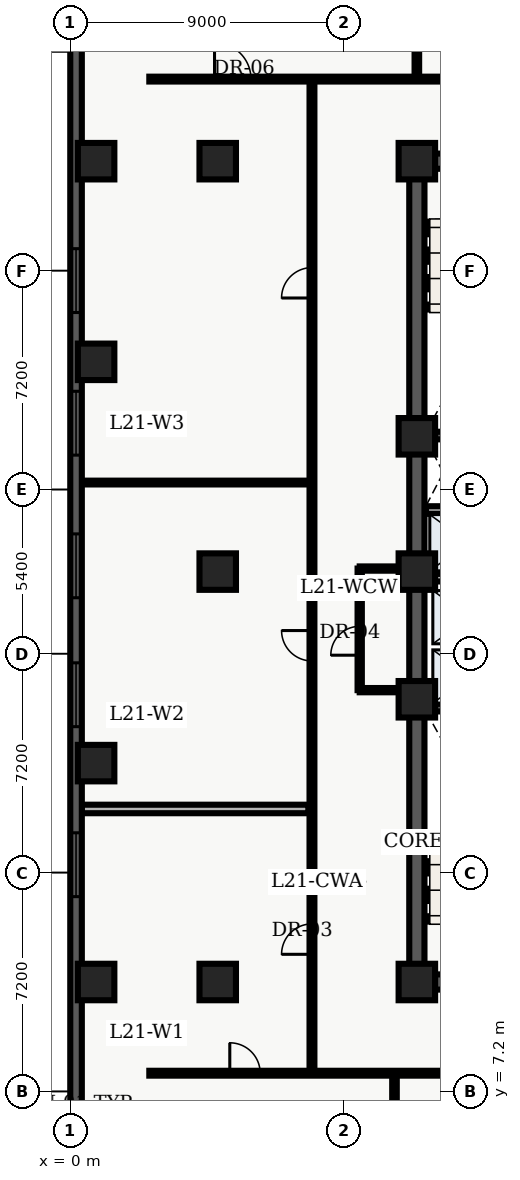
"""IFC4 building model, lengths in metres.
Left out: names, types, materials, properties, quantities, classifications, styles, units other than length and angle.
Written with IfcOpenShell. Run it as: python <this file> out.ifc"""

import sys

from ifc_helpers import new_model, entity, si_unit, converted_unit, direction, frame, origin_with_axes, origin_2d_with_axis, place, context, subcontext, project, spatial, polyline, rectangle, outline, extrude, element, fill, save


model = new_model("IFC4")
c1 = context("Model", 3, precision=1e-05, world=origin_with_axes(), true_north=direction((0.0, 1.0)))
c2 = subcontext(c1, "Body", "Model", "MODEL_VIEW")
j1 = project(units=[si_unit("LENGTHUNIT", "METRE"), converted_unit("PLANEANGLEUNIT", "DEGREE", entity("IfcPlaneAngleMeasure", 0.017), si_unit("PLANEANGLEUNIT", "RADIAN"), dimensions=[0, 0, 0, 0, 0, 0, 0])], contexts=[c1])
p1 = place(None, origin_with_axes())
s1 = spatial("IfcSite", under=j1, at=p1, CompositionType="ELEMENT")
p2 = place(p1, origin_with_axes())
s2 = spatial("IfcBuilding", under=s1, at=p2, CompositionType="ELEMENT")
p3 = place(p2, frame((0.0, 0.0, 89.1), z_axis=(0.0, 0.0, 1.0), x_axis=(1.0, 0.0, 0.0)))
s3 = spatial("IfcBuildingStorey", under=s2, at=p3, CompositionType="ELEMENT", Elevation=89.1)
p4 = place(p3, frame((11.4, 10.8, 0.0), z_axis=(0.0, 0.0, 1.0), x_axis=(0.0, 1.0, 0.0)))
e1 = element("IfcWall", 1, at=p4, inside=s3, PredefinedType="SHEAR", context=c2, shape_type="SweptSolid", body=[
    extrude(outline(polyline([(0.0, -0.25), (27.0, -0.25), (27.0, 0.25), (0.0, 0.25), (0.0, -0.25)])), origin_with_axes(), (0.0, 0.0, 1.0), 3.66),
])
p5 = place(p3, frame((11.4, 10.8, 0.0), z_axis=(0.0, 0.0, 1.0), x_axis=(1.0, 0.0, 0.0)))
e2 = element("IfcWall", 2, at=p5, inside=s3, PredefinedType="SHEAR", context=c2, shape_type="SweptSolid", body=[
    extrude(outline(polyline([(0.0, -0.25), (7.2, -0.25), (7.2, 0.25), (0.0, 0.25), (0.0, -0.25)])), origin_with_axes(), (0.0, 0.0, 1.0), 3.66),
])
p6 = place(p5, frame((2.625, 0.0, 0.0), z_axis=(0.0, 0.0, 1.0), x_axis=(1.0, 0.0, 0.0)))
e3 = element("IfcOpeningElement", 3, at=p6, cuts=e2, PredefinedType="OPENING", context=c2, shape_type="SweptSolid", body=[
    extrude(rectangle(XDim=1.05, YDim=0.52, at=origin_2d_with_axis()), origin_with_axes(), (0.0, 0.0, 1.0), 2.15),
])
p7 = place(p3, frame((11.4, 37.8, 0.0), z_axis=(0.0, 0.0, 1.0), x_axis=(1.0, 0.0, 0.0)))
e4 = element("IfcWall", 4, at=p7, inside=s3, PredefinedType="SHEAR", context=c2, shape_type="SweptSolid", body=[
    extrude(outline(polyline([(0.0, -0.25), (7.2, -0.25), (7.2, 0.25), (0.0, 0.25), (0.0, -0.25)])), origin_with_axes(), (0.0, 0.0, 1.0), 3.66),
])
p8 = place(p7, frame((2.625, 0.0, 0.0), z_axis=(0.0, 0.0, 1.0), x_axis=(1.0, 0.0, 0.0)))
e5 = element("IfcOpeningElement", 5, at=p8, cuts=e4, PredefinedType="OPENING", context=c2, shape_type="SweptSolid", body=[
    extrude(rectangle(XDim=1.05, YDim=0.52, at=origin_2d_with_axis()), origin_with_axes(), (0.0, 0.0, 1.0), 2.15),
])
for number, where, z_axis, x_axis in (
    (6, (11.65, 19.825, 0.0), (0.0, 0.0, 1.0), (1.0, 0.0, 0.0)),
    (7, (11.65, 28.775, 0.0), (0.0, 0.0, 1.0), (1.0, 0.0, 0.0)),
):
    element("IfcWall", number, at=place(p3, frame(where, z_axis=z_axis, x_axis=x_axis)), inside=s3, PredefinedType="SHEAR", context=c2, shape_type="SweptSolid", body=[
        extrude(outline(polyline([(0.0, -0.125), (6.7, -0.125), (6.7, 0.125), (0.0, 0.125), (0.0, -0.125)])), origin_with_axes(), (0.0, 0.0, 1.0), 3.66),
    ])
p9 = place(p3, frame((11.7, 24.1, 0.0), z_axis=(0.0, 0.0, 1.0), x_axis=(1.0, 0.0, 0.0)))
e8 = element("IfcWall", 8, at=p9, inside=s3, PredefinedType="SOLIDWALL", context=c2, shape_type="SweptSolid", body=[
    extrude(outline(polyline([(0.0, -0.125), (6.6, -0.125), (6.6, 0.125), (0.0, 0.125), (0.0, -0.125)])), origin_with_axes(), (0.0, 0.0, 1.0), 2.7),
])
p10 = place(p9, frame((3.75, 0.0, 0.0), z_axis=(0.0, 0.0, 1.0), x_axis=(1.0, 0.0, 0.0)))
e9 = element("IfcOpeningElement", 9, at=p10, cuts=e8, PredefinedType="OPENING", context=c2, shape_type="SweptSolid", body=[
    extrude(rectangle(XDim=0.9, YDim=0.27, at=origin_2d_with_axis()), origin_with_axes(), (0.0, 0.0, 1.0), 2.15),
])
p11 = place(p3, frame((11.7, 26.325, 0.0), z_axis=(0.0, 0.0, 1.0), x_axis=(1.0, 0.0, 0.0)))
e10 = element("IfcWall", 10, at=p11, inside=s3, PredefinedType="SOLIDWALL", context=c2, shape_type="SweptSolid", body=[
    extrude(outline(polyline([(0.0, -0.125), (6.6, -0.125), (6.6, 0.125), (0.0, 0.125), (0.0, -0.125)])), origin_with_axes(), (0.0, 0.0, 1.0), 2.7),
])
p12 = place(p11, frame((3.5, 0.0, 0.0), z_axis=(0.0, 0.0, 1.0), x_axis=(1.0, 0.0, 0.0)))
e11 = element("IfcOpeningElement", 11, at=p12, cuts=e10, PredefinedType="OPENING", context=c2, shape_type="SweptSolid", body=[
    extrude(rectangle(XDim=0.9, YDim=0.27, at=origin_2d_with_axis()), origin_with_axes(), (0.0, 0.0, 1.0), 2.15),
])
for number, where, z_axis, x_axis in (
    (12, (11.4, 10.8, 0.0), (0.0, 0.0, 1.0), (1.0, 0.0, 0.0)),
    (13, (11.4, 20.1, 0.0), (0.0, 0.0, 1.0), (1.0, 0.0, 0.0)),
    (14, (11.4, 24.3, 0.0), (0.0, 0.0, 1.0), (1.0, 0.0, 0.0)),
    (15, (11.4, 28.75, 0.0), (0.0, 0.0, 1.0), (1.0, 0.0, 0.0)),
    (16, (11.4, 37.8, 0.0), (0.0, 0.0, 1.0), (1.0, 0.0, 0.0)),
    (17, (4.85, 10.8, 0.0), (0.0, 0.0, 1.0), (1.0, 0.0, 0.0)),
    (18, (4.85, 24.3, 0.0), (0.0, 0.0, 1.0), (1.0, 0.0, 0.0)),
    (19, (4.85, 37.8, 0.0), (0.0, 0.0, 1.0), (1.0, 0.0, 0.0)),
    (20, (0.85, 10.8, 0.0), (0.0, 0.0, 1.0), (1.0, 0.0, 0.0)),
    (21, (0.85, 18.0, 0.0), (0.0, 0.0, 1.0), (1.0, 0.0, 0.0)),
    (22, (0.85, 31.2, 0.0), (0.0, 0.0, 1.0), (1.0, 0.0, 0.0)),
    (23, (0.85, 37.8, 0.0), (0.0, 0.0, 1.0), (1.0, 0.0, 0.0)),
):
    element("IfcColumn", number, at=place(p3, frame(where, z_axis=z_axis, x_axis=x_axis)), inside=s3, PredefinedType="COLUMN", context=c2, shape_type="SweptSolid", body=[
        extrude(rectangle(XDim=1.2, YDim=1.2, at=origin_2d_with_axis()), origin_with_axes(), (0.0, 0.0, 1.0), 3.9),
    ])
p13 = place(p3, frame((9.52, 20.4, 0.0), z_axis=(0.0, 0.0, 1.0), x_axis=(0.0, 1.0, 0.0)))
e24 = element("IfcWall", 24, at=p13, inside=s3, PredefinedType="PARTITIONING", context=c2, shape_type="SweptSolid", body=[
    extrude(outline(polyline([(0.0, -0.07), (4.0, -0.07), (4.0, 0.07), (0.0, 0.07), (0.0, -0.07)])), origin_with_axes(), (0.0, 0.0, 1.0), 2.7),
])
p14 = place(p13, frame((1.625, 0.0, 0.0), z_axis=(0.0, 0.0, 1.0), x_axis=(1.0, 0.0, 0.0)))
e25 = element("IfcOpeningElement", 25, at=p14, cuts=e24, PredefinedType="OPENING", context=c2, shape_type="SweptSolid", body=[
    extrude(rectangle(XDim=0.95, YDim=0.16, at=origin_2d_with_axis()), origin_with_axes(), (0.0, 0.0, 1.0), 2.15),
])
for number, where, z_axis, x_axis in (
    (26, (9.52, 20.4, 0.0), (0.0, 0.0, 1.0), (1.0, 0.0, 0.0)),
    (27, (9.52, 24.4, 0.0), (0.0, 0.0, 1.0), (1.0, 0.0, 0.0)),
):
    element("IfcWall", number, at=place(p3, frame(where, z_axis=z_axis, x_axis=x_axis)), inside=s3, PredefinedType="PARTITIONING", context=c2, shape_type="SweptSolid", body=[
        extrude(outline(polyline([(0.0, -0.07), (1.58, -0.07), (1.58, 0.07), (0.0, 0.07), (0.0, -0.07)])), origin_with_axes(), (0.0, 0.0, 1.0), 2.7),
    ])
p15 = place(p3, frame((2.6, 7.8, 0.0), z_axis=(0.0, 0.0, 1.0), x_axis=(1.0, 0.0, 0.0)))
e28 = element("IfcWall", 28, at=p15, inside=s3, PredefinedType="PARTITIONING", context=c2, shape_type="SweptSolid", body=[
    extrude(outline(polyline([(0.0, -0.08), (18.625, -0.08), (18.625, 0.08), (0.0, 0.08), (0.0, -0.08)])), origin_with_axes(), (0.0, 0.0, 1.0), 2.7),
])
p16 = place(p15, frame((3.147, 0.0, 0.0), z_axis=(0.0, 0.0, 1.0), x_axis=(1.0, 0.0, 0.0)))
e29 = element("IfcOpeningElement", 29, at=p16, cuts=e28, PredefinedType="OPENING", context=c2, shape_type="SweptSolid", body=[
    extrude(rectangle(XDim=1.0, YDim=0.18, at=origin_2d_with_axis()), origin_with_axes(), (0.0, 0.0, 1.0), 2.15),
])
p17 = place(p15, frame((13.282, 0.0, 0.0), z_axis=(0.0, 0.0, 1.0), x_axis=(1.0, 0.0, 0.0)))
e30 = element("IfcOpeningElement", 30, at=p17, cuts=e28, PredefinedType="OPENING", context=c2, shape_type="SweptSolid", body=[
    extrude(rectangle(XDim=1.0, YDim=0.18, at=origin_2d_with_axis()), origin_with_axes(), (0.0, 0.0, 1.0), 2.15),
])
p18 = place(p3, frame((2.6, 40.5, 0.0), z_axis=(0.0, 0.0, 1.0), x_axis=(1.0, 0.0, 0.0)))
e31 = element("IfcWall", 31, at=p18, inside=s3, PredefinedType="PARTITIONING", context=c2, shape_type="SweptSolid", body=[
    extrude(outline(polyline([(0.0, -0.08), (18.65, -0.08), (18.65, 0.08), (0.0, 0.08), (0.0, -0.08)])), origin_with_axes(), (0.0, 0.0, 1.0), 2.7),
])
p19 = place(p18, frame((2.745, 0.0, 0.0), z_axis=(0.0, 0.0, 1.0), x_axis=(1.0, 0.0, 0.0)))
e32 = element("IfcOpeningElement", 32, at=p19, cuts=e31, PredefinedType="OPENING", context=c2, shape_type="SweptSolid", body=[
    extrude(rectangle(XDim=1.2, YDim=0.18, at=origin_2d_with_axis()), origin_with_axes(), (0.0, 0.0, 1.0), 2.2),
])
p20 = place(p18, frame((12.61, 0.0, 0.0), z_axis=(0.0, 0.0, 1.0), x_axis=(1.0, 0.0, 0.0)))
e33 = element("IfcOpeningElement", 33, at=p20, cuts=e31, PredefinedType="OPENING", context=c2, shape_type="SweptSolid", body=[
    extrude(rectangle(XDim=1.0, YDim=0.18, at=origin_2d_with_axis()), origin_with_axes(), (0.0, 0.0, 1.0), 2.15),
])
p21 = place(p3, frame((7.95, 7.8, 0.0), z_axis=(0.0, 0.0, 1.0), x_axis=(0.0, 1.0, 0.0)))
e34 = element("IfcWall", 34, at=p21, inside=s3, PredefinedType="PARTITIONING", context=c2, shape_type="SweptSolid", body=[
    extrude(outline(polyline([(0.0, -0.08), (32.7, -0.08), (32.7, 0.08), (0.0, 0.08), (0.0, -0.08)])), origin_with_axes(), (0.0, 0.0, 1.0), 2.7),
])
p22 = place(p21, frame((4.411, 0.0, 0.0), z_axis=(0.0, 0.0, 1.0), x_axis=(1.0, 0.0, 0.0)))
e35 = element("IfcOpeningElement", 35, at=p22, cuts=e34, PredefinedType="OPENING", context=c2, shape_type="SweptSolid", body=[
    extrude(rectangle(XDim=1.0, YDim=0.18, at=origin_2d_with_axis()), origin_with_axes(), (0.0, 0.0, 1.0), 2.15),
])
p23 = place(p21, frame((14.06, 0.0, 0.0), z_axis=(0.0, 0.0, 1.0), x_axis=(1.0, 0.0, 0.0)))
e36 = element("IfcOpeningElement", 36, at=p23, cuts=e34, PredefinedType="OPENING", context=c2, shape_type="SweptSolid", body=[
    extrude(rectangle(XDim=1.0, YDim=0.18, at=origin_2d_with_axis()), origin_with_axes(), (0.0, 0.0, 1.0), 2.15),
])
p24 = place(p21, frame((26.0, 0.0, 0.0), z_axis=(0.0, 0.0, 1.0), x_axis=(1.0, 0.0, 0.0)))
e37 = element("IfcOpeningElement", 37, at=p24, cuts=e34, PredefinedType="OPENING", context=c2, shape_type="SweptSolid", body=[
    extrude(rectangle(XDim=1.0, YDim=0.18, at=origin_2d_with_axis()), origin_with_axes(), (0.0, 0.0, 1.0), 2.15),
])
p25 = place(p3, frame((0.375, 16.492, 0.0), z_axis=(0.0, 0.0, 1.0), x_axis=(1.0, 0.0, 0.0)))
e38 = element("IfcWall", 38, at=p25, inside=s3, PredefinedType="PARTITIONING", context=c2, shape_type="SweptSolid", body=[
    extrude(outline(polyline([(0.0, -0.14), (7.455, -0.14), (7.455, 0.14), (0.0, 0.14), (0.0, -0.14)])), origin_with_axes(), (0.0, 0.0, 1.0), 2.7),
])
p26 = place(p3, frame((0.375, 27.229, 0.0), z_axis=(0.0, 0.0, 1.0), x_axis=(1.0, 0.0, 0.0)))
e39 = element("IfcWall", 39, at=p26, inside=s3, PredefinedType="PARTITIONING", context=c2, shape_type="SweptSolid", body=[
    extrude(outline(polyline([(0.0, -0.062), (7.455, -0.062), (7.455, 0.062), (0.0, 0.062), (0.0, -0.062)])), origin_with_axes(), (0.0, 0.0, 1.0), 2.7),
])
p27 = place(p3, frame((10.664, 0.36, 0.0), z_axis=(0.0, 0.0, 1.0), x_axis=(0.0, 1.0, 0.0)))
e40 = element("IfcWall", 40, at=p27, inside=s3, PredefinedType="PARTITIONING", context=c2, shape_type="SweptSolid", body=[
    extrude(outline(polyline([(0.0, -0.075), (7.34, -0.075), (7.34, 0.075), (0.0, 0.075), (0.0, -0.075)])), origin_with_axes(), (0.0, 0.0, 1.0), 2.7),
])
p28 = place(p3, frame((11.4, 40.6, 0.0), z_axis=(0.0, 0.0, 1.0), x_axis=(0.0, 1.0, 0.0)))
e41 = element("IfcWall", 41, at=p28, inside=s3, PredefinedType="PARTITIONING", context=c2, shape_type="SweptSolid", body=[
    extrude(outline(polyline([(0.0, -0.075), (7.64, -0.075), (7.64, 0.075), (0.0, 0.075), (0.0, -0.075)])), origin_with_axes(), (0.0, 0.0, 1.0), 2.7),
])
p29 = place(p3, frame((0.19, 2.78, 0.0), z_axis=(0.0, 0.0, 1.0), x_axis=(0.0, 1.0, 0.0)))
e42 = element("IfcWall", 42, at=p29, inside=s3, PredefinedType="SOLIDWALL", context=c2, shape_type="SweptSolid", body=[
    extrude(outline(polyline([(0.0, -0.19), (43.42, -0.19), (43.42, 0.19), (0.0, 0.19), (0.0, -0.19)])), origin_with_axes(), (0.0, 0.0, 1.0), 3.66),
])
p30 = place(p29, frame((2.946, 0.0, 0.45), z_axis=(0.0, 0.0, 1.0), x_axis=(1.0, 0.0, 0.0)))
e43 = element("IfcOpeningElement", 43, at=p30, cuts=e42, PredefinedType="OPENING", context=c2, shape_type="SweptSolid", body=[
    extrude(rectangle(XDim=2.1, YDim=0.4, at=origin_2d_with_axis()), origin_with_axes(), (0.0, 0.0, 1.0), 2.2),
])
p31 = place(p29, frame((11.878, 0.0, 0.45), z_axis=(0.0, 0.0, 1.0), x_axis=(1.0, 0.0, 0.0)))
e44 = element("IfcOpeningElement", 44, at=p31, cuts=e42, PredefinedType="OPENING", context=c2, shape_type="SweptSolid", body=[
    extrude(rectangle(XDim=2.1, YDim=0.4, at=origin_2d_with_axis()), origin_with_axes(), (0.0, 0.0, 1.0), 2.2),
])
p32 = place(p29, frame((17.469, 0.0, 0.45), z_axis=(0.0, 0.0, 1.0), x_axis=(1.0, 0.0, 0.0)))
e45 = element("IfcOpeningElement", 45, at=p32, cuts=e42, PredefinedType="OPENING", context=c2, shape_type="SweptSolid", body=[
    extrude(rectangle(XDim=2.1, YDim=0.4, at=origin_2d_with_axis()), origin_with_axes(), (0.0, 0.0, 1.0), 2.2),
])
p33 = place(p29, frame((21.71, 0.0, 0.45), z_axis=(0.0, 0.0, 1.0), x_axis=(1.0, 0.0, 0.0)))
e46 = element("IfcOpeningElement", 46, at=p33, cuts=e42, PredefinedType="OPENING", context=c2, shape_type="SweptSolid", body=[
    extrude(rectangle(XDim=2.1, YDim=0.4, at=origin_2d_with_axis()), origin_with_axes(), (0.0, 0.0, 1.0), 2.2),
])
p34 = place(p29, frame((26.401, 0.0, 0.45), z_axis=(0.0, 0.0, 1.0), x_axis=(1.0, 0.0, 0.0)))
e47 = element("IfcOpeningElement", 47, at=p34, cuts=e42, PredefinedType="OPENING", context=c2, shape_type="SweptSolid", body=[
    extrude(rectangle(XDim=2.1, YDim=0.4, at=origin_2d_with_axis()), origin_with_axes(), (0.0, 0.0, 1.0), 2.2),
])
p35 = place(p29, frame((31.092, 0.0, 0.45), z_axis=(0.0, 0.0, 1.0), x_axis=(1.0, 0.0, 0.0)))
e48 = element("IfcOpeningElement", 48, at=p35, cuts=e42, PredefinedType="OPENING", context=c2, shape_type="SweptSolid", body=[
    extrude(rectangle(XDim=2.1, YDim=0.4, at=origin_2d_with_axis()), origin_with_axes(), (0.0, 0.0, 1.0), 2.2),
])
p36 = place(p29, frame((40.024, 0.0, 0.45), z_axis=(0.0, 0.0, 1.0), x_axis=(1.0, 0.0, 0.0)))
e49 = element("IfcOpeningElement", 49, at=p36, cuts=e42, PredefinedType="OPENING", context=c2, shape_type="SweptSolid", body=[
    extrude(rectangle(XDim=2.1, YDim=0.4, at=origin_2d_with_axis()), origin_with_axes(), (0.0, 0.0, 1.0), 2.2),
])
p37 = place(p13, frame((1.625, 0.0, 0.0), z_axis=(0.0, 0.0, 1.0), x_axis=(1.0, 0.0, 0.0)))
e50 = element("IfcDoor", 50, at=p37, inside=s3, OperationType="SINGLE_SWING_LEFT", PredefinedType="DOOR", context=c2, shape_type="SweptSolid", body=[
    extrude(rectangle(XDim=0.95, YDim=0.084, at=origin_2d_with_axis()), origin_with_axes(), (0.0, 0.0, 1.0), 2.15),
])
fill(e25, e50)
p38 = place(p21, frame((4.411, 0.0, 0.0), z_axis=(0.0, 0.0, 1.0), x_axis=(1.0, 0.0, 0.0)))
e51 = element("IfcDoor", 51, at=p38, inside=s3, OperationType="SINGLE_SWING_LEFT", PredefinedType="DOOR", context=c2, shape_type="SweptSolid", body=[
    extrude(rectangle(XDim=1.0, YDim=0.09, at=origin_2d_with_axis()), origin_with_axes(), (0.0, 0.0, 1.0), 2.15),
])
fill(e35, e51)
p39 = place(p21, frame((14.06, 0.0, 0.0), z_axis=(0.0, 0.0, 1.0), x_axis=(1.0, 0.0, 0.0)))
e52 = element("IfcDoor", 52, at=p39, inside=s3, OperationType="SINGLE_SWING_RIGHT", PredefinedType="DOOR", context=c2, shape_type="SweptSolid", body=[
    extrude(rectangle(XDim=1.0, YDim=0.09, at=origin_2d_with_axis()), origin_with_axes(), (0.0, 0.0, 1.0), 2.15),
])
fill(e36, e52)
p40 = place(p21, frame((26.0, 0.0, 0.0), z_axis=(0.0, 0.0, 1.0), x_axis=(1.0, 0.0, 0.0)))
e53 = element("IfcDoor", 53, at=p40, inside=s3, OperationType="SINGLE_SWING_LEFT", PredefinedType="DOOR", context=c2, shape_type="SweptSolid", body=[
    extrude(rectangle(XDim=1.0, YDim=0.09, at=origin_2d_with_axis()), origin_with_axes(), (0.0, 0.0, 1.0), 2.15),
])
fill(e37, e53)
p41 = place(p15, frame((3.147, 0.0, 0.0), z_axis=(0.0, 0.0, 1.0), x_axis=(1.0, 0.0, 0.0)))
e54 = element("IfcDoor", 54, at=p41, inside=s3, OperationType="SINGLE_SWING_LEFT", PredefinedType="DOOR", context=c2, shape_type="SweptSolid", body=[
    extrude(rectangle(XDim=1.0, YDim=0.09, at=origin_2d_with_axis()), origin_with_axes(), (0.0, 0.0, 1.0), 2.15),
])
fill(e29, e54)
p42 = place(p18, frame((2.745, 0.0, 0.0), z_axis=(0.0, 0.0, 1.0), x_axis=(1.0, 0.0, 0.0)))
e55 = element("IfcDoor", 55, at=p42, inside=s3, OperationType="SINGLE_SWING_LEFT", PredefinedType="DOOR", context=c2, shape_type="SweptSolid", body=[
    extrude(rectangle(XDim=1.2, YDim=0.09, at=origin_2d_with_axis()), origin_with_axes(), (0.0, 0.0, 1.0), 2.2),
])
fill(e32, e55)
p43 = place(p29, frame((11.878, 0.0, 0.45), z_axis=(0.0, 0.0, 1.0), x_axis=(1.0, 0.0, 0.0)))
e56 = element("IfcWindow", 56, at=p43, inside=s3, PredefinedType="WINDOW", context=c2, shape_type="SweptSolid", body=[
    extrude(rectangle(XDim=2.1, YDim=0.09, at=origin_2d_with_axis()), origin_with_axes(), (0.0, 0.0, 1.0), 2.2),
])
fill(e44, e56)
p44 = place(p29, frame((17.469, 0.0, 0.45), z_axis=(0.0, 0.0, 1.0), x_axis=(1.0, 0.0, 0.0)))
e57 = element("IfcWindow", 57, at=p44, inside=s3, PredefinedType="WINDOW", context=c2, shape_type="SweptSolid", body=[
    extrude(rectangle(XDim=2.1, YDim=0.09, at=origin_2d_with_axis()), origin_with_axes(), (0.0, 0.0, 1.0), 2.2),
])
fill(e45, e57)
p45 = place(p29, frame((21.71, 0.0, 0.45), z_axis=(0.0, 0.0, 1.0), x_axis=(1.0, 0.0, 0.0)))
e58 = element("IfcWindow", 58, at=p45, inside=s3, PredefinedType="WINDOW", context=c2, shape_type="SweptSolid", body=[
    extrude(rectangle(XDim=2.1, YDim=0.09, at=origin_2d_with_axis()), origin_with_axes(), (0.0, 0.0, 1.0), 2.2),
])
fill(e46, e58)
p46 = place(p29, frame((26.401, 0.0, 0.45), z_axis=(0.0, 0.0, 1.0), x_axis=(1.0, 0.0, 0.0)))
e59 = element("IfcWindow", 59, at=p46, inside=s3, PredefinedType="WINDOW", context=c2, shape_type="SweptSolid", body=[
    extrude(rectangle(XDim=2.1, YDim=0.09, at=origin_2d_with_axis()), origin_with_axes(), (0.0, 0.0, 1.0), 2.2),
])
fill(e47, e59)
p47 = place(p29, frame((31.092, 0.0, 0.45), z_axis=(0.0, 0.0, 1.0), x_axis=(1.0, 0.0, 0.0)))
e60 = element("IfcWindow", 60, at=p47, inside=s3, PredefinedType="WINDOW", context=c2, shape_type="SweptSolid", body=[
    extrude(rectangle(XDim=2.1, YDim=0.09, at=origin_2d_with_axis()), origin_with_axes(), (0.0, 0.0, 1.0), 2.2),
])
fill(e48, e60)
save(model, sys.argv[1])
